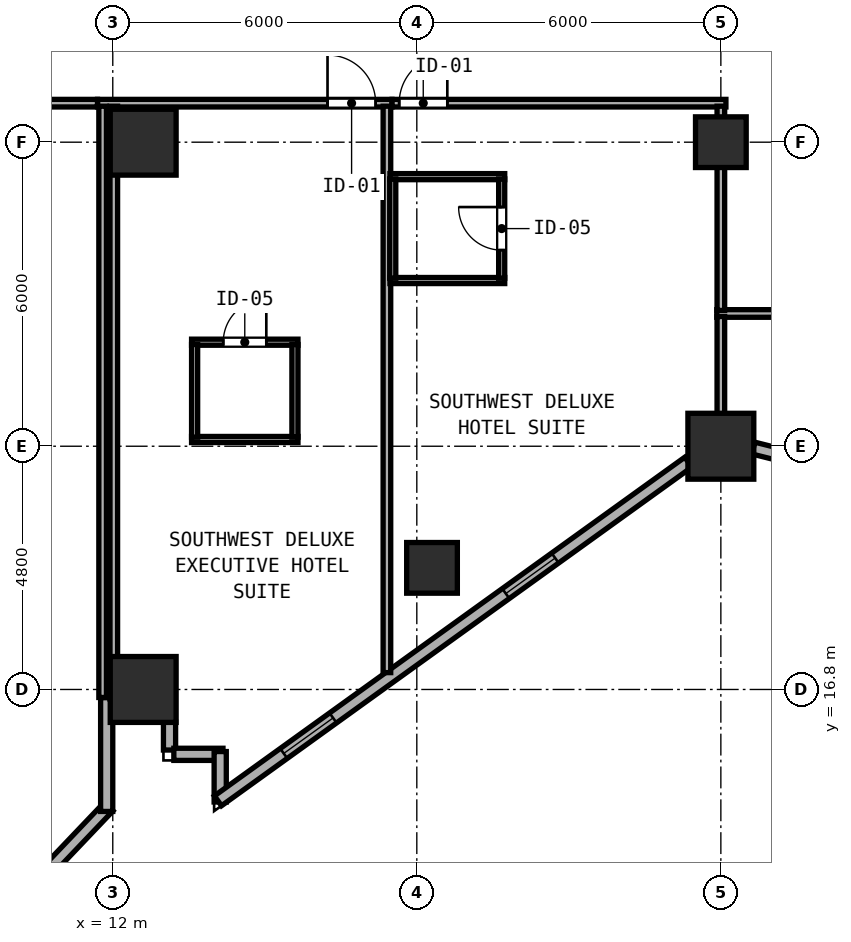
"""IFC4 building model, lengths in metres.
Left out: names, types, materials, properties, quantities, classifications, styles, units other than length and angle.
Written with IfcOpenShell. Run it as: python <this file> out.ifc"""

import sys

from ifc_helpers import new_model, si_unit, direction, frame, frame_2d, origin, origin_2d, place, context, subcontext, project, spatial, rectangle, hollow_rectangle, extrude, element, fill, save


model = new_model("IFC4")
c1 = context("Model", 3, precision=1e-05, world=origin(), true_north=direction((0.0, 1.0)))
c2 = subcontext(c1, "Body", "Model", "MODEL_VIEW")
j1 = project(units=[si_unit("LENGTHUNIT", "METRE"), si_unit("PLANEANGLEUNIT", "RADIAN")], contexts=[c1])
p1 = place(None, origin())
s1 = spatial("IfcSite", under=j1, at=p1, CompositionType="ELEMENT")
p2 = place(p1, origin())
s2 = spatial("IfcBuilding", under=s1, at=p2, CompositionType="ELEMENT")
p3 = place(p2, frame((0.0, 0.0, 31.6)))
s3 = spatial("IfcBuildingStorey", under=s2, at=p3, CompositionType="ELEMENT", Elevation=31.6)
for number, where, z_axis, x_axis in (
    (1, (24.0, 21.6, 0.0), (0.0, 0.0, 1.0), (1.0, 0.0, 0.0)),
    (2, (12.6, 16.8, 0.0), (0.0, 0.0, 1.0), (1.0, 0.0, 0.0)),
    (3, (12.6, 27.6, 0.0), (0.0, 0.0, 1.0), (1.0, 0.0, 0.0)),
):
    element("IfcColumn", number, at=place(p3, frame(where, z_axis=z_axis, x_axis=x_axis)), inside=s3, PredefinedType="COLUMN", context=c2, shape_type="SweptSolid", body=[
        extrude(hollow_rectangle(XDim=1.3, YDim=1.3, WallThickness=0.048, at=origin_2d()), origin(), (0.0, 0.0, 1.0), 3.8),
    ])
for number, where, z_axis, x_axis in (
    (4, (24.0, 27.6, 0.0), (0.0, 0.0, 1.0), (1.0, 0.0, 0.0)),
    (5, (18.3, 19.2, 0.0), (0.0, 0.0, 1.0), (1.0, 0.0, 0.0)),
):
    element("IfcColumn", number, at=place(p3, frame(where, z_axis=z_axis, x_axis=x_axis)), inside=s3, PredefinedType="COLUMN", context=c2, shape_type="SweptSolid", body=[
        extrude(hollow_rectangle(XDim=1.0, YDim=1.0, WallThickness=0.038, at=origin_2d()), origin(), (0.0, 0.0, 1.0), 3.8),
    ])
p4 = place(p3, frame((4.939, 7.154, 0.0), z_axis=(0.0, 0.0, 1.0), x_axis=(0.689370300416, 0.724409130881, 0.0)))
e6 = element("IfcWall", 6, at=p4, inside=s3, PredefinedType="SOLIDWALL", context=c2, shape_type="SweptSolid", body=[
    extrude(rectangle(XDim=10.124, YDim=0.24, at=frame_2d((5.062, 0.0))), origin(), (0.0, 0.0, 1.0), 3.6),
])
p5 = place(p4, frame((1.6, 0.0, 0.85)))
e7 = element("IfcOpeningElement", 7, at=p5, cuts=e6, PredefinedType="OPENING", context=c2, shape_type="SweptSolid", body=[
    extrude(rectangle(XDim=1.2, YDim=1.85, at=frame_2d((0.6, 0.925))), frame((0.0, 0.13, 0.0), z_axis=(0.0, -1.0, 0.0), x_axis=(1.0, 0.0, 0.0)), (0.0, 0.0, 1.0), 0.26),
])
p6 = place(p4, frame((7.0, 0.0, 0.85)))
e8 = element("IfcOpeningElement", 8, at=p6, cuts=e6, PredefinedType="OPENING", context=c2, shape_type="SweptSolid", body=[
    extrude(rectangle(XDim=1.2, YDim=1.85, at=frame_2d((0.6, 0.925))), frame((0.0, 0.13, 0.0), z_axis=(0.0, -1.0, 0.0), x_axis=(1.0, 0.0, 0.0)), (0.0, 0.0, 1.0), 0.26),
])
p7 = place(p3, frame((11.88, 14.393, 0.0), z_axis=(0.0, 0.0, 1.0), x_axis=(0.0, 1.0, 0.0)))
e9 = element("IfcWall", 9, at=p7, inside=s3, PredefinedType="SOLIDWALL", context=c2, shape_type="SweptSolid", body=[
    extrude(rectangle(XDim=2.247, YDim=0.24, at=frame_2d((1.124, 0.0))), origin(), (0.0, 0.0, 1.0), 3.6),
])
p8 = place(p3, frame((13.12, 16.158, 0.0), z_axis=(0.0, 0.0, 1.0), x_axis=(0.0, -1.0, 0.0)))
e10 = element("IfcWall", 10, at=p8, inside=s3, PredefinedType="SOLIDWALL", context=c2, shape_type="SweptSolid", body=[
    extrude(rectangle(XDim=0.553, YDim=0.24, at=frame_2d((0.276, 0.0))), origin(), (0.0, 0.0, 1.0), 3.6),
])
p9 = place(p3, frame((13.205, 15.52, 0.0), z_axis=(0.0, 0.0, 1.0), x_axis=(1.0, 0.0, 0.0)))
e11 = element("IfcWall", 11, at=p9, inside=s3, PredefinedType="SOLIDWALL", context=c2, shape_type="SweptSolid", body=[
    extrude(rectangle(XDim=0.97, YDim=0.24, at=frame_2d((0.485, 0.0))), origin(), (0.0, 0.0, 1.0), 3.6),
])
p10 = place(p3, frame((14.12, 15.575, 0.0), z_axis=(0.0, 0.0, 1.0), x_axis=(0.0, -1.0, 0.0)))
e12 = element("IfcWall", 12, at=p10, inside=s3, PredefinedType="SOLIDWALL", context=c2, shape_type="SweptSolid", body=[
    extrude(rectangle(XDim=0.996, YDim=0.24, at=frame_2d((0.498, 0.0))), origin(), (0.0, 0.0, 1.0), 3.6),
])
p11 = place(p3, frame((14.075, 14.602, 0.0), z_axis=(0.0, 0.0, 1.0), x_axis=(0.811535555989, 0.584303038984, 0.0)))
e13 = element("IfcWall", 13, at=p11, inside=s3, PredefinedType="SOLIDWALL", context=c2, shape_type="SweptSolid", body=[
    extrude(rectangle(XDim=11.438, YDim=0.24, at=frame_2d((5.719, 0.0))), origin(), (0.0, 0.0, 1.0), 3.097),
])
p12 = place(p11, frame((1.6, 0.0, 0.85)))
e14 = element("IfcOpeningElement", 14, at=p12, cuts=e13, PredefinedType="OPENING", context=c2, shape_type="SweptSolid", body=[
    extrude(rectangle(XDim=1.2, YDim=1.85, at=frame_2d((0.6, 0.925))), frame((0.0, 0.13, 0.0), z_axis=(0.0, -1.0, 0.0), x_axis=(1.0, 0.0, 0.0)), (0.0, 0.0, 1.0), 0.26),
])
p13 = place(p11, frame((7.0, 0.0, 0.85)))
e15 = element("IfcOpeningElement", 15, at=p13, cuts=e13, PredefinedType="OPENING", context=c2, shape_type="SweptSolid", body=[
    extrude(rectangle(XDim=1.2, YDim=1.85, at=frame_2d((0.6, 0.925))), frame((0.0, 0.13, 0.0), z_axis=(0.0, -1.0, 0.0), x_axis=(1.0, 0.0, 0.0)), (0.0, 0.0, 1.0), 0.26),
])
p14 = place(p3, frame((24.642, 21.563, 0.0), z_axis=(0.0, 0.0, 1.0), x_axis=(0.970135906278, -0.242561998982, 0.0)))
e16 = element("IfcWall", 16, at=p14, inside=s3, PredefinedType="SOLIDWALL", context=c2, shape_type="SweptSolid", body=[
    extrude(rectangle(XDim=4.356, YDim=0.24, at=frame_2d((2.178, 0.0))), origin(), (0.0, 0.0, 1.0), 3.097),
])
p15 = place(p14, frame((1.6, 0.0, 0.85)))
e17 = element("IfcOpeningElement", 17, at=p15, cuts=e16, PredefinedType="OPENING", context=c2, shape_type="SweptSolid", body=[
    extrude(rectangle(XDim=1.2, YDim=1.85, at=frame_2d((0.6, 0.925))), frame((0.0, 0.13, 0.0), z_axis=(0.0, -1.0, 0.0), x_axis=(1.0, 0.0, 0.0)), (0.0, 0.0, 1.0), 0.26),
])
p16 = place(p3, frame((23.92, 24.22, 0.0), z_axis=(0.0, 0.0, 1.0), x_axis=(1.0, 0.0, 0.0)))
e18 = element("IfcWall", 18, at=p16, inside=s3, PredefinedType="PARTITIONING", context=c2, shape_type="SweptSolid", body=[
    extrude(rectangle(XDim=7.36, YDim=0.15, at=frame_2d((3.68, 0.0))), origin(), (0.0, 0.0, 1.0), 3.6),
])
p17 = place(p16, frame((5.845, 0.0, 0.0), z_axis=(0.0, 0.0, 1.0), x_axis=(-1.0, 0.0, 0.0)))
e19 = element("IfcOpeningElement", 19, at=p17, cuts=e18, PredefinedType="OPENING", context=c2, shape_type="SweptSolid", body=[
    extrude(rectangle(XDim=0.95, YDim=2.12, at=frame_2d((0.475, 1.06))), frame((0.0, 0.085, 0.0), z_axis=(0.0, -1.0, 0.0), x_axis=(1.0, 0.0, 0.0)), (0.0, 0.0, 1.0), 0.17),
])
p18 = place(p3, frame((24.0, 21.819, 0.0), z_axis=(0.0, 0.0, 1.0), x_axis=(0.0, 1.0, 0.0)))
e20 = element("IfcWall", 20, at=p18, inside=s3, PredefinedType="PARTITIONING", context=c2, shape_type="SweptSolid", body=[
    extrude(rectangle(XDim=2.341, YDim=0.15, at=frame_2d((1.171, 0.0))), origin(), (0.0, 0.0, 1.0), 3.097),
])
p19 = place(p3, frame((11.7, 28.37, 0.0), z_axis=(0.0, 0.0, 1.0), x_axis=(1.0, 0.0, 0.0)))
e21 = element("IfcWall", 21, at=p19, inside=s3, PredefinedType="PARTITIONING", context=c2, shape_type="SweptSolid", body=[
    extrude(rectangle(XDim=5.81, YDim=0.15, at=frame_2d((2.905, 0.0))), origin(), (0.0, 0.0, 1.0), 3.6),
])
p20 = place(p19, frame((5.488, 0.0, 0.0), z_axis=(0.0, 0.0, 1.0), x_axis=(-1.0, 0.0, 0.0)))
e22 = element("IfcOpeningElement", 22, at=p20, cuts=e21, PredefinedType="OPENING", context=c2, shape_type="SweptSolid", body=[
    extrude(rectangle(XDim=0.95, YDim=2.18, at=frame_2d((0.475, 1.09))), frame((0.0, 0.085, 0.0), z_axis=(0.0, -1.0, 0.0), x_axis=(1.0, 0.0, 0.0)), (0.0, 0.0, 1.0), 0.17),
])
p21 = place(p3, frame((11.8, 16.642, 0.0), z_axis=(0.0, 0.0, 1.0), x_axis=(0.0, 1.0, 0.0)))
e23 = element("IfcWall", 23, at=p21, inside=s3, PredefinedType="PARTITIONING", context=c2, shape_type="SweptSolid", body=[
    extrude(rectangle(XDim=11.668, YDim=0.15, at=frame_2d((5.834, 0.0))), origin(), (0.0, 0.0, 1.0), 3.6),
])
p22 = place(p3, frame((17.41, 17.133, 0.0), z_axis=(0.0, 0.0, 1.0), x_axis=(0.0, 1.0, 0.0)))
e24 = element("IfcWall", 24, at=p22, inside=s3, PredefinedType="PARTITIONING", context=c2, shape_type="SweptSolid", body=[
    extrude(rectangle(XDim=11.177, YDim=0.15, at=frame_2d((5.589, 0.0))), origin(), (0.0, 0.0, 1.0), 3.6),
])
p23 = place(p3, frame((13.555, 23.653, 0.0), z_axis=(0.0, 0.0, 1.0), x_axis=(1.0, 0.0, 0.0)))
e25 = element("IfcWall", 25, at=p23, inside=s3, PredefinedType="PARTITIONING", context=c2, shape_type="SweptSolid", body=[
    extrude(rectangle(XDim=2.1, YDim=0.12, at=frame_2d((1.05, 0.0))), origin(), (0.0, 0.0, 1.0), 3.6),
])
p24 = place(p23, frame((1.475, 0.0, 0.0), z_axis=(0.0, 0.0, 1.0), x_axis=(-1.0, 0.0, 0.0)))
e26 = element("IfcOpeningElement", 26, at=p24, cuts=e25, PredefinedType="OPENING", context=c2, shape_type="SweptSolid", body=[
    extrude(rectangle(XDim=0.85, YDim=2.1, at=frame_2d((0.425, 1.05))), frame((0.0, 0.07, 0.0), z_axis=(0.0, -1.0, 0.0), x_axis=(1.0, 0.0, 0.0)), (0.0, 0.0, 1.0), 0.14),
])
p25 = place(p3, frame((13.555, 21.733, 0.0), z_axis=(0.0, 0.0, 1.0), x_axis=(1.0, 0.0, 0.0)))
e27 = element("IfcWall", 27, at=p25, inside=s3, PredefinedType="PARTITIONING", context=c2, shape_type="SweptSolid", body=[
    extrude(rectangle(XDim=2.1, YDim=0.12, at=frame_2d((1.05, 0.0))), origin(), (0.0, 0.0, 1.0), 3.6),
])
for number, where, z_axis, x_axis in (
    (28, (13.615, 21.778, 0.0), (0.0, 0.0, 1.0), (0.0, 1.0, 0.0)),
    (29, (15.595, 21.778, 0.0), (0.0, 0.0, 1.0), (0.0, 1.0, 0.0)),
):
    element("IfcWall", number, at=place(p3, frame(where, z_axis=z_axis, x_axis=x_axis)), inside=s3, PredefinedType="PARTITIONING", context=c2, shape_type="SweptSolid", body=[
        extrude(rectangle(XDim=1.83, YDim=0.12, at=frame_2d((0.915, 0.0))), origin(), (0.0, 0.0, 1.0), 3.6),
    ])
p26 = place(p3, frame((17.512, 28.37, 0.0), z_axis=(0.0, 0.0, 1.0), x_axis=(1.0, 0.0, 0.0)))
e30 = element("IfcWall", 30, at=p26, inside=s3, PredefinedType="PARTITIONING", context=c2, shape_type="SweptSolid", body=[
    extrude(rectangle(XDim=6.588, YDim=0.15, at=frame_2d((3.294, 0.0))), origin(), (0.0, 0.0, 1.0), 3.6),
])
p27 = place(p26, frame((1.09, 0.0, 0.0), z_axis=(0.0, 0.0, 1.0), x_axis=(-1.0, 0.0, 0.0)))
e31 = element("IfcOpeningElement", 31, at=p27, cuts=e30, PredefinedType="OPENING", context=c2, shape_type="SweptSolid", body=[
    extrude(rectangle(XDim=0.95, YDim=2.18, at=frame_2d((0.475, 1.09))), frame((0.0, 0.085, 0.0), z_axis=(0.0, -1.0, 0.0), x_axis=(1.0, 0.0, 0.0)), (0.0, 0.0, 1.0), 0.17),
])
p28 = place(p3, frame((24.0, 24.28, 0.0), z_axis=(0.0, 0.0, 1.0), x_axis=(0.0, 1.0, 0.0)))
e32 = element("IfcWall", 32, at=p28, inside=s3, PredefinedType="PARTITIONING", context=c2, shape_type="SweptSolid", body=[
    extrude(rectangle(XDim=4.03, YDim=0.15, at=frame_2d((2.015, 0.0))), origin(), (0.0, 0.0, 1.0), 3.097),
])
p29 = place(p3, frame((17.47, 26.92, 0.0), z_axis=(0.0, 0.0, 1.0), x_axis=(1.0, 0.0, 0.0)))
e33 = element("IfcWall", 33, at=p29, inside=s3, PredefinedType="PARTITIONING", context=c2, shape_type="SweptSolid", body=[
    extrude(rectangle(XDim=2.265, YDim=0.12, at=frame_2d((1.133, 0.0))), origin(), (0.0, 0.0, 1.0), 3.6),
])
p30 = place(p3, frame((17.47, 24.87, 0.0), z_axis=(0.0, 0.0, 1.0), x_axis=(1.0, 0.0, 0.0)))
e34 = element("IfcWall", 34, at=p30, inside=s3, PredefinedType="PARTITIONING", context=c2, shape_type="SweptSolid", body=[
    extrude(rectangle(XDim=2.265, YDim=0.12, at=frame_2d((1.133, 0.0))), origin(), (0.0, 0.0, 1.0), 3.185),
])
p31 = place(p3, frame((17.525, 24.915, 0.0), z_axis=(0.0, 0.0, 1.0), x_axis=(0.0, 1.0, 0.0)))
e35 = element("IfcWall", 35, at=p31, inside=s3, PredefinedType="PARTITIONING", context=c2, shape_type="SweptSolid", body=[
    extrude(rectangle(XDim=1.96, YDim=0.12, at=frame_2d((0.98, 0.0))), origin(), (0.0, 0.0, 1.0), 3.6),
])
p32 = place(p3, frame((19.675, 24.915, 0.0), z_axis=(0.0, 0.0, 1.0), x_axis=(0.0, 1.0, 0.0)))
e36 = element("IfcWall", 36, at=p32, inside=s3, PredefinedType="PARTITIONING", context=c2, shape_type="SweptSolid", body=[
    extrude(rectangle(XDim=1.96, YDim=0.12, at=frame_2d((0.98, 0.0))), origin(), (0.0, 0.0, 1.0), 3.6),
])
p33 = place(p32, frame((0.555, 0.0, 0.0)))
e37 = element("IfcOpeningElement", 37, at=p33, cuts=e36, PredefinedType="OPENING", context=c2, shape_type="SweptSolid", body=[
    extrude(rectangle(XDim=0.85, YDim=2.1, at=frame_2d((0.425, 1.05))), frame((0.0, 0.07, 0.0), z_axis=(0.0, -1.0, 0.0), x_axis=(1.0, 0.0, 0.0)), (0.0, 0.0, 1.0), 0.14),
])
p34 = place(p3, frame((3.185, 28.37, 0.0), z_axis=(0.0, 0.0, 1.0), x_axis=(1.0, 0.0, 0.0)))
e38 = element("IfcWall", 38, at=p34, inside=s3, PredefinedType="PARTITIONING", context=c2, shape_type="SweptSolid", body=[
    extrude(rectangle(XDim=8.513, YDim=0.15, at=frame_2d((4.256, 0.0))), origin(), (0.0, 0.0, 1.0), 3.6),
])
p35 = place(p34, frame((4.937, 0.0, 0.0), z_axis=(0.0, 0.0, 1.0), x_axis=(-1.0, 0.0, 0.0)))
e39 = element("IfcOpeningElement", 39, at=p35, cuts=e38, PredefinedType="OPENING", context=c2, shape_type="SweptSolid", body=[
    extrude(rectangle(XDim=0.95, YDim=2.18, at=frame_2d((0.475, 1.09))), frame((0.0, 0.085, 0.0), z_axis=(0.0, -1.0, 0.0), x_axis=(1.0, 0.0, 0.0)), (0.0, 0.0, 1.0), 0.17),
])
p36 = place(p3, frame((12.02, 16.612, 0.0), z_axis=(0.0, 0.0, 1.0), x_axis=(0.0, 1.0, 0.0)))
e40 = element("IfcWall", 40, at=p36, inside=s3, PredefinedType="PARTITIONING", context=c2, shape_type="SweptSolid", body=[
    extrude(rectangle(XDim=11.698, YDim=0.15, at=frame_2d((5.849, 0.0))), origin(), (0.0, 0.0, 1.0), 3.6),
])
p37 = place(p12, origin())
e41 = element("IfcWindow", 41, at=p37, inside=s3, PartitioningType="SINGLE_PANEL", PredefinedType="WINDOW", context=c2, shape_type="SweptSolid", body=[
    extrude(rectangle(XDim=1.2, YDim=1.85, at=frame_2d((0.6, 0.925))), frame((0.0, 0.03, 0.0), z_axis=(0.0, -1.0, 0.0), x_axis=(1.0, 0.0, 0.0)), (0.0, 0.0, 1.0), 0.06),
])
fill(e14, e41)
p38 = place(p13, origin())
e42 = element("IfcWindow", 42, at=p38, inside=s3, PartitioningType="SINGLE_PANEL", PredefinedType="WINDOW", context=c2, shape_type="SweptSolid", body=[
    extrude(rectangle(XDim=1.2, YDim=1.85, at=frame_2d((0.6, 0.925))), frame((0.0, 0.03, 0.0), z_axis=(0.0, -1.0, 0.0), x_axis=(1.0, 0.0, 0.0)), (0.0, 0.0, 1.0), 0.06),
])
fill(e15, e42)
p39 = place(p20, origin())
e43 = element("IfcDoor", 43, at=p39, inside=s3, OperationType="SINGLE_SWING_RIGHT", PredefinedType="DOOR", context=c2, shape_type="SweptSolid", body=[
    extrude(rectangle(XDim=0.95, YDim=2.18, at=frame_2d((0.475, 1.09))), frame((0.0, 0.025, 0.0), z_axis=(0.0, -1.0, 0.0), x_axis=(1.0, 0.0, 0.0)), (0.0, 0.0, 1.0), 0.05),
])
fill(e22, e43)
p40 = place(p24, origin())
e44 = element("IfcDoor", 44, at=p40, inside=s3, OperationType="SINGLE_SWING_LEFT", PredefinedType="DOOR", context=c2, shape_type="SweptSolid", body=[
    extrude(rectangle(XDim=0.85, YDim=2.1, at=frame_2d((0.425, 1.05))), frame((0.0, 0.025, 0.0), z_axis=(0.0, -1.0, 0.0), x_axis=(1.0, 0.0, 0.0)), (0.0, 0.0, 1.0), 0.05),
])
fill(e26, e44)
p41 = place(p27, origin())
e45 = element("IfcDoor", 45, at=p41, inside=s3, OperationType="SINGLE_SWING_LEFT", PredefinedType="DOOR", context=c2, shape_type="SweptSolid", body=[
    extrude(rectangle(XDim=0.95, YDim=2.18, at=frame_2d((0.475, 1.09))), frame((0.0, 0.025, 0.0), z_axis=(0.0, -1.0, 0.0), x_axis=(1.0, 0.0, 0.0)), (0.0, 0.0, 1.0), 0.05),
])
fill(e31, e45)
p42 = place(p33, origin())
e46 = element("IfcDoor", 46, at=p42, inside=s3, OperationType="SINGLE_SWING_RIGHT", PredefinedType="DOOR", context=c2, shape_type="SweptSolid", body=[
    extrude(rectangle(XDim=0.85, YDim=2.1, at=frame_2d((0.425, 1.05))), frame((0.0, 0.025, 0.0), z_axis=(0.0, -1.0, 0.0), x_axis=(1.0, 0.0, 0.0)), (0.0, 0.0, 1.0), 0.05),
])
fill(e37, e46)
save(model, sys.argv[1])
